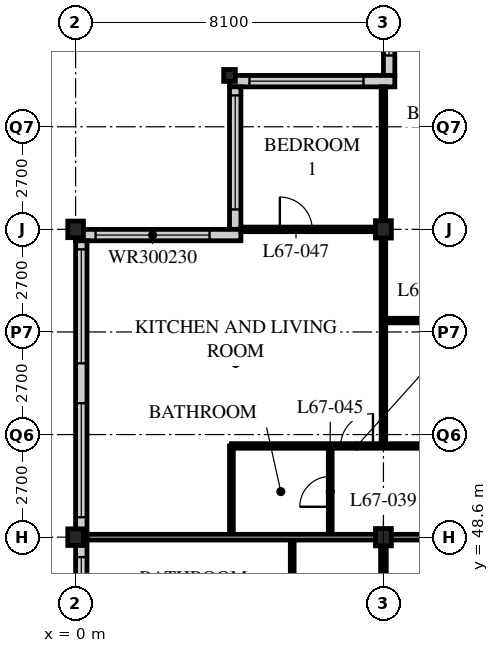
"""IFC4 building model, lengths in metres.
Left out: names, types, materials, properties, quantities, classifications, styles, units other than length and angle.
Written with IfcOpenShell. Run it as: python <this file> out.ifc"""

import sys

from ifc_helpers import new_model, si_unit, direction, frame, frame_2d, origin, origin_2d, place, context, subcontext, project, spatial, rectangle, i_section, extrude, element, fill, save


model = new_model("IFC4")
c1 = context("Model", 3, precision=1e-05, world=origin(), true_north=direction((0.0, 1.0)))
c2 = subcontext(c1, "Body", "Model", "MODEL_VIEW")
j1 = project(units=[si_unit("LENGTHUNIT", "METRE"), si_unit("PLANEANGLEUNIT", "RADIAN")], contexts=[c1])
p1 = place(None, origin())
s1 = spatial("IfcSite", under=j1, at=p1, CompositionType="ELEMENT")
p2 = place(p1, origin())
s2 = spatial("IfcBuilding", under=s1, at=p2, CompositionType="ELEMENT")
p3 = place(p2, frame((0.0, 0.0, 261.9)))
s3 = spatial("IfcBuildingStorey", under=s2, at=p3, CompositionType="ELEMENT", Elevation=261.9)
for number, where, z_axis, x_axis in (
    (1, (0.0, 48.6, 0.0), (0.0, 0.0, 1.0), (1.0, 0.0, 0.0)),
    (2, (0.0, 56.7, 0.0), (0.0, 0.0, 1.0), (1.0, 0.0, 0.0)),
):
    element("IfcColumn", number, at=place(p3, frame(where, z_axis=z_axis, x_axis=x_axis)), inside=s3, PredefinedType="COLUMN", context=c2, shape_type="SweptSolid", body=[
        extrude(i_section(OverallWidth=0.412, OverallDepth=0.437, WebThickness=0.036, FlangeThickness=0.058, FilletRadius=0.015, at=origin_2d()), origin(), (0.0, 0.0, 1.0), 3.9),
    ])
p4 = place(p3, frame((4.05, 60.75, 0.0), z_axis=(0.0, 0.0, 1.0), x_axis=(1.0, 0.0, 0.0)))
e3 = element("IfcColumn", 3, at=p4, inside=s3, PredefinedType="COLUMN", context=c2, shape_type="SweptSolid", body=[
    extrude(i_section(OverallWidth=0.307, OverallDepth=0.314, WebThickness=0.012, FlangeThickness=0.019, FilletRadius=0.015, at=origin_2d()), origin(), (0.0, 0.0, 1.0), 3.9),
])
for number, where, z_axis, x_axis in (
    (4, (8.1, 48.6, 0.0), (0.0, 0.0, 1.0), (1.0, 0.0, 0.0)),
    (5, (8.1, 56.7, 0.0), (0.0, 0.0, 1.0), (1.0, 0.0, 0.0)),
):
    element("IfcColumn", number, at=place(p3, frame(where, z_axis=z_axis, x_axis=x_axis)), inside=s3, PredefinedType="COLUMN", context=c2, shape_type="SweptSolid", body=[
        extrude(i_section(OverallWidth=0.418, OverallDepth=0.456, WebThickness=0.042, FlangeThickness=0.067, FilletRadius=0.015, at=origin_2d()), origin(), (0.0, 0.0, 1.0), 3.9),
    ])
p5 = place(p3, frame((8.25, 64.5, 0.0), z_axis=(0.0, 0.0, 1.0), x_axis=(0.0, -1.0, 0.0)))
e6 = element("IfcWall", 6, at=p5, inside=s3, PredefinedType="SOLIDWALL", context=c2, shape_type="SweptSolid", body=[
    extrude(rectangle(XDim=3.75, YDim=0.3, at=frame_2d((1.875, 0.0))), origin(), (0.0, 0.0, 1.0), 3.69),
])
p6 = place(p5, frame((0.225, 0.0, 0.6)))
e7 = element("IfcOpeningElement", 7, at=p6, cuts=e6, PredefinedType="OPENING", context=c2, shape_type="SweptSolid", body=[
    extrude(rectangle(XDim=3.0, YDim=2.3, at=frame_2d((1.5, 1.15))), frame((0.0, 0.16, 0.0), z_axis=(0.0, -1.0, 0.0), x_axis=(1.0, 0.0, 0.0)), (0.0, 0.0, 1.0), 0.32),
])
p7 = place(p3, frame((8.4, 60.6, 0.0), z_axis=(0.0, 0.0, 1.0), x_axis=(-1.0, 0.0, 0.0)))
e8 = element("IfcWall", 8, at=p7, inside=s3, PredefinedType="SOLIDWALL", context=c2, shape_type="SweptSolid", body=[
    extrude(rectangle(XDim=4.35, YDim=0.3, at=frame_2d((2.175, 0.0))), origin(), (0.0, 0.0, 1.0), 3.69),
])
p8 = place(p7, frame((0.825, 0.0, 0.6)))
e9 = element("IfcOpeningElement", 9, at=p8, cuts=e8, PredefinedType="OPENING", context=c2, shape_type="SweptSolid", body=[
    extrude(rectangle(XDim=3.0, YDim=2.3, at=frame_2d((1.5, 1.15))), frame((0.0, 0.16, 0.0), z_axis=(0.0, -1.0, 0.0), x_axis=(1.0, 0.0, 0.0)), (0.0, 0.0, 1.0), 0.32),
])
p9 = place(p3, frame((4.2, 60.45, 0.0), z_axis=(0.0, 0.0, 1.0), x_axis=(0.0, -1.0, 0.0)))
e10 = element("IfcWall", 10, at=p9, inside=s3, PredefinedType="SOLIDWALL", context=c2, shape_type="SweptSolid", body=[
    extrude(rectangle(XDim=3.75, YDim=0.3, at=frame_2d((1.875, 0.0))), origin(), (0.0, 0.0, 1.0), 3.69),
])
p10 = place(p9, frame((0.225, 0.0, 0.6)))
e11 = element("IfcOpeningElement", 11, at=p10, cuts=e10, PredefinedType="OPENING", context=c2, shape_type="SweptSolid", body=[
    extrude(rectangle(XDim=3.0, YDim=2.3, at=frame_2d((1.5, 1.15))), frame((0.0, 0.16, 0.0), z_axis=(0.0, -1.0, 0.0), x_axis=(1.0, 0.0, 0.0)), (0.0, 0.0, 1.0), 0.32),
])
p11 = place(p3, frame((4.35, 56.55, 0.0), z_axis=(0.0, 0.0, 1.0), x_axis=(-1.0, 0.0, 0.0)))
e12 = element("IfcWall", 12, at=p11, inside=s3, PredefinedType="SOLIDWALL", context=c2, shape_type="SweptSolid", body=[
    extrude(rectangle(XDim=4.35, YDim=0.3, at=frame_2d((2.175, 0.0))), origin(), (0.0, 0.0, 1.0), 3.69),
])
p12 = place(p11, frame((0.825, 0.0, 0.6)))
e13 = element("IfcOpeningElement", 13, at=p12, cuts=e12, PredefinedType="OPENING", context=c2, shape_type="SweptSolid", body=[
    extrude(rectangle(XDim=3.0, YDim=2.3, at=frame_2d((1.5, 1.15))), frame((0.0, 0.16, 0.0), z_axis=(0.0, -1.0, 0.0), x_axis=(1.0, 0.0, 0.0)), (0.0, 0.0, 1.0), 0.32),
])
p13 = place(p3, frame((0.15, 56.4, 0.0), z_axis=(0.0, 0.0, 1.0), x_axis=(0.0, -1.0, 0.0)))
e14 = element("IfcWall", 14, at=p13, inside=s3, PredefinedType="SOLIDWALL", context=c2, shape_type="SweptSolid", body=[
    extrude(rectangle(XDim=32.1, YDim=0.3, at=frame_2d((16.05, 0.0))), origin(), (0.0, 0.0, 1.0), 3.69),
])
p14 = place(p13, frame((0.225, 0.0, 0.6)))
e15 = element("IfcOpeningElement", 15, at=p14, cuts=e14, PredefinedType="OPENING", context=c2, shape_type="SweptSolid", body=[
    extrude(rectangle(XDim=3.0, YDim=2.4, at=frame_2d((1.5, 1.2))), frame((0.0, 0.16, 0.0), z_axis=(0.0, -1.0, 0.0), x_axis=(1.0, 0.0, 0.0)), (0.0, 0.0, 1.0), 0.32),
])
p15 = place(p13, frame((4.275, 0.0, 0.6)))
e16 = element("IfcOpeningElement", 16, at=p15, cuts=e14, PredefinedType="OPENING", context=c2, shape_type="SweptSolid", body=[
    extrude(rectangle(XDim=3.0, YDim=2.4, at=frame_2d((1.5, 1.2))), frame((0.0, 0.16, 0.0), z_axis=(0.0, -1.0, 0.0), x_axis=(1.0, 0.0, 0.0)), (0.0, 0.0, 1.0), 0.32),
])
p16 = place(p13, frame((8.325, 0.0, 0.6)))
e17 = element("IfcOpeningElement", 17, at=p16, cuts=e14, PredefinedType="OPENING", context=c2, shape_type="SweptSolid", body=[
    extrude(rectangle(XDim=3.0, YDim=2.4, at=frame_2d((1.5, 1.2))), frame((0.0, 0.16, 0.0), z_axis=(0.0, -1.0, 0.0), x_axis=(1.0, 0.0, 0.0)), (0.0, 0.0, 1.0), 0.32),
])
p17 = place(p13, frame((12.375, 0.0, 0.6)))
e18 = element("IfcOpeningElement", 18, at=p17, cuts=e14, PredefinedType="OPENING", context=c2, shape_type="SweptSolid", body=[
    extrude(rectangle(XDim=3.0, YDim=2.4, at=frame_2d((1.5, 1.2))), frame((0.0, 0.16, 0.0), z_axis=(0.0, -1.0, 0.0), x_axis=(1.0, 0.0, 0.0)), (0.0, 0.0, 1.0), 0.32),
])
p18 = place(p13, frame((16.425, 0.0, 0.6)))
e19 = element("IfcOpeningElement", 19, at=p18, cuts=e14, PredefinedType="OPENING", context=c2, shape_type="SweptSolid", body=[
    extrude(rectangle(XDim=3.0, YDim=2.4, at=frame_2d((1.5, 1.2))), frame((0.0, 0.16, 0.0), z_axis=(0.0, -1.0, 0.0), x_axis=(1.0, 0.0, 0.0)), (0.0, 0.0, 1.0), 0.32),
])
p19 = place(p13, frame((20.475, 0.0, 0.6)))
e20 = element("IfcOpeningElement", 20, at=p19, cuts=e14, PredefinedType="OPENING", context=c2, shape_type="SweptSolid", body=[
    extrude(rectangle(XDim=3.0, YDim=2.4, at=frame_2d((1.5, 1.2))), frame((0.0, 0.16, 0.0), z_axis=(0.0, -1.0, 0.0), x_axis=(1.0, 0.0, 0.0)), (0.0, 0.0, 1.0), 0.32),
])
p20 = place(p13, frame((24.525, 0.0, 0.6)))
e21 = element("IfcOpeningElement", 21, at=p20, cuts=e14, PredefinedType="OPENING", context=c2, shape_type="SweptSolid", body=[
    extrude(rectangle(XDim=3.0, YDim=2.4, at=frame_2d((1.5, 1.2))), frame((0.0, 0.16, 0.0), z_axis=(0.0, -1.0, 0.0), x_axis=(1.0, 0.0, 0.0)), (0.0, 0.0, 1.0), 0.32),
])
p21 = place(p13, frame((28.575, 0.0, 0.6)))
e22 = element("IfcOpeningElement", 22, at=p21, cuts=e14, PredefinedType="OPENING", context=c2, shape_type="SweptSolid", body=[
    extrude(rectangle(XDim=3.0, YDim=2.4, at=frame_2d((1.5, 1.2))), frame((0.0, 0.16, 0.0), z_axis=(0.0, -1.0, 0.0), x_axis=(1.0, 0.0, 0.0)), (0.0, 0.0, 1.0), 0.32),
])
p22 = place(p3, frame((8.1, 48.6, 0.0), z_axis=(0.0, 0.0, 1.0), x_axis=(1.0, 0.0, 0.0)))
e23 = element("IfcWall", 23, at=p22, inside=s3, PredefinedType="PARTITIONING", context=c2, shape_type="SweptSolid", body=[
    extrude(rectangle(XDim=28.35, YDim=0.15, at=frame_2d((14.175, 0.0))), origin(), (0.0, 0.0, 1.0), 3.078),
])
p23 = place(p22, frame((4.45, 0.0, 0.0)))
e24 = element("IfcOpeningElement", 24, at=p23, cuts=e23, PredefinedType="OPENING", context=c2, shape_type="SweptSolid", body=[
    extrude(rectangle(XDim=1.0, YDim=2.1, at=frame_2d((0.5, 1.05))), frame((0.0, 0.085, 0.0), z_axis=(0.0, -1.0, 0.0), x_axis=(1.0, 0.0, 0.0)), (0.0, 0.0, 1.0), 0.17),
])
p24 = place(p22, frame((20.65, 0.0, 0.0)))
e25 = element("IfcOpeningElement", 25, at=p24, cuts=e23, PredefinedType="OPENING", context=c2, shape_type="SweptSolid", body=[
    extrude(rectangle(XDim=1.0, YDim=2.1, at=frame_2d((0.5, 1.05))), frame((0.0, 0.085, 0.0), z_axis=(0.0, -1.0, 0.0), x_axis=(1.0, 0.0, 0.0)), (0.0, 0.0, 1.0), 0.17),
])
p25 = place(p22, frame((1.525, 0.0, 0.0)))
e26 = element("IfcOpeningElement", 26, at=p25, cuts=e23, PredefinedType="OPENING", context=c2, shape_type="SweptSolid", body=[
    extrude(rectangle(XDim=1.0, YDim=2.1, at=frame_2d((0.5, 1.05))), frame((0.0, 0.085, 0.0), z_axis=(0.0, -1.0, 0.0), x_axis=(1.0, 0.0, 0.0)), (0.0, 0.0, 1.0), 0.17),
])
p26 = place(p3, frame((8.1, 22.5, 0.0), z_axis=(0.0, 0.0, 1.0), x_axis=(0.0, 1.0, 0.0)))
e27 = element("IfcWall", 27, at=p26, inside=s3, PredefinedType="PARTITIONING", context=c2, shape_type="SweptSolid", body=[
    extrude(rectangle(XDim=26.1, YDim=0.15, at=frame_2d((13.05, 0.0))), origin(), (0.0, 0.0, 1.0), 3.078),
])
p27 = place(p26, frame((2.65, 0.0, 0.0)))
e28 = element("IfcOpeningElement", 28, at=p27, cuts=e27, PredefinedType="OPENING", context=c2, shape_type="SweptSolid", body=[
    extrude(rectangle(XDim=1.0, YDim=2.1, at=frame_2d((0.5, 1.05))), frame((0.0, 0.085, 0.0), z_axis=(0.0, -1.0, 0.0), x_axis=(1.0, 0.0, 0.0)), (0.0, 0.0, 1.0), 0.17),
])
p28 = place(p26, frame((22.75, 0.0, 0.0)))
e29 = element("IfcOpeningElement", 29, at=p28, cuts=e27, PredefinedType="OPENING", context=c2, shape_type="SweptSolid", body=[
    extrude(rectangle(XDim=1.0, YDim=2.1, at=frame_2d((0.5, 1.05))), frame((0.0, 0.085, 0.0), z_axis=(0.0, -1.0, 0.0), x_axis=(1.0, 0.0, 0.0)), (0.0, 0.0, 1.0), 0.17),
])
p29 = place(p3, frame((5.7, 46.4, 0.0), z_axis=(0.0, 0.0, 1.0), x_axis=(0.0, 1.0, 0.0)))
e30 = element("IfcWall", 30, at=p29, inside=s3, PredefinedType="PARTITIONING", context=c2, shape_type="SweptSolid", body=[
    extrude(rectangle(XDim=2.2, YDim=0.1, at=frame_2d((1.1, 0.0))), origin(), (0.0, 0.0, 1.0), 3.69),
])
p30 = place(p3, frame((6.7, 48.6, 0.0), z_axis=(0.0, 0.0, 1.0), x_axis=(0.0, 1.0, 0.0)))
e31 = element("IfcWall", 31, at=p30, inside=s3, PredefinedType="PARTITIONING", context=c2, shape_type="SweptSolid", body=[
    extrude(rectangle(XDim=2.4, YDim=0.1, at=frame_2d((1.2, 0.0))), origin(), (0.0, 0.0, 1.0), 3.69),
])
p31 = place(p30, frame((0.8, 0.0, 0.0)))
e32 = element("IfcOpeningElement", 32, at=p31, cuts=e31, PredefinedType="OPENING", context=c2, shape_type="SweptSolid", body=[
    extrude(rectangle(XDim=0.8, YDim=2.1, at=frame_2d((0.4, 1.05))), frame((0.0, 0.06, 0.0), z_axis=(0.0, -1.0, 0.0), x_axis=(1.0, 0.0, 0.0)), (0.0, 0.0, 1.0), 0.12),
])
p32 = place(p3, frame((4.1, 48.6, 0.0), z_axis=(0.0, 0.0, 1.0), x_axis=(0.0, 1.0, 0.0)))
e33 = element("IfcWall", 33, at=p32, inside=s3, PredefinedType="PARTITIONING", context=c2, shape_type="SweptSolid", body=[
    extrude(rectangle(XDim=2.4, YDim=0.1, at=frame_2d((1.2, 0.0))), origin(), (0.0, 0.0, 1.0), 3.69),
])
p33 = place(p3, frame((4.1, 51.0, 0.0), z_axis=(0.0, 0.0, 1.0), x_axis=(1.0, 0.0, 0.0)))
e34 = element("IfcWall", 34, at=p33, inside=s3, PredefinedType="PARTITIONING", context=c2, shape_type="SweptSolid", body=[
    extrude(rectangle(XDim=32.35, YDim=0.12, at=frame_2d((16.175, 0.0))), origin(), (0.0, 0.0, 1.0), 3.69),
])
p34 = place(p33, frame((9.025, 0.0, 0.0)))
e35 = element("IfcOpeningElement", 35, at=p34, cuts=e34, PredefinedType="OPENING", context=c2, shape_type="SweptSolid", body=[
    extrude(rectangle(XDim=0.85, YDim=2.1, at=frame_2d((0.425, 1.05))), frame((0.0, 0.07, 0.0), z_axis=(0.0, -1.0, 0.0), x_axis=(1.0, 0.0, 0.0)), (0.0, 0.0, 1.0), 0.14),
])
p35 = place(p33, frame((16.475, 0.0, 0.0)))
e36 = element("IfcOpeningElement", 36, at=p35, cuts=e34, PredefinedType="OPENING", context=c2, shape_type="SweptSolid", body=[
    extrude(rectangle(XDim=0.85, YDim=2.1, at=frame_2d((0.425, 1.05))), frame((0.0, 0.07, 0.0), z_axis=(0.0, -1.0, 0.0), x_axis=(1.0, 0.0, 0.0)), (0.0, 0.0, 1.0), 0.14),
])
p36 = place(p33, frame((20.525, 0.0, 0.0)))
e37 = element("IfcOpeningElement", 37, at=p36, cuts=e34, PredefinedType="OPENING", context=c2, shape_type="SweptSolid", body=[
    extrude(rectangle(XDim=0.85, YDim=2.1, at=frame_2d((0.425, 1.05))), frame((0.0, 0.07, 0.0), z_axis=(0.0, -1.0, 0.0), x_axis=(1.0, 0.0, 0.0)), (0.0, 0.0, 1.0), 0.14),
])
p37 = place(p33, frame((25.225, 0.0, 0.0)))
e38 = element("IfcOpeningElement", 38, at=p37, cuts=e34, PredefinedType="OPENING", context=c2, shape_type="SweptSolid", body=[
    extrude(rectangle(XDim=0.85, YDim=2.1, at=frame_2d((0.425, 1.05))), frame((0.0, 0.07, 0.0), z_axis=(0.0, -1.0, 0.0), x_axis=(1.0, 0.0, 0.0)), (0.0, 0.0, 1.0), 0.14),
])
p38 = place(p33, frame((28.625, 0.0, 0.0)))
e39 = element("IfcOpeningElement", 39, at=p38, cuts=e34, PredefinedType="OPENING", context=c2, shape_type="SweptSolid", body=[
    extrude(rectangle(XDim=0.85, YDim=2.1, at=frame_2d((0.425, 1.05))), frame((0.0, 0.07, 0.0), z_axis=(0.0, -1.0, 0.0), x_axis=(1.0, 0.0, 0.0)), (0.0, 0.0, 1.0), 0.14),
])
p39 = place(p33, frame((6.725, 0.0, 0.0)))
e40 = element("IfcOpeningElement", 40, at=p39, cuts=e34, PredefinedType="OPENING", context=c2, shape_type="SweptSolid", body=[
    extrude(rectangle(XDim=0.85, YDim=2.1, at=frame_2d((0.425, 1.05))), frame((0.0, 0.07, 0.0), z_axis=(0.0, -1.0, 0.0), x_axis=(1.0, 0.0, 0.0)), (0.0, 0.0, 1.0), 0.14),
])
p40 = place(p33, frame((2.875, 0.0, 0.0)))
e41 = element("IfcOpeningElement", 41, at=p40, cuts=e34, PredefinedType="OPENING", context=c2, shape_type="SweptSolid", body=[
    extrude(rectangle(XDim=0.85, YDim=2.1, at=frame_2d((0.425, 1.05))), frame((0.0, 0.07, 0.0), z_axis=(0.0, -1.0, 0.0), x_axis=(1.0, 0.0, 0.0)), (0.0, 0.0, 1.0), 0.14),
])
p41 = place(p3, frame((8.1, 51.0, 0.0), z_axis=(0.0, 0.0, 1.0), x_axis=(0.0, 1.0, 0.0)))
e42 = element("IfcWall", 42, at=p41, inside=s3, PredefinedType="PARTITIONING", context=c2, shape_type="SweptSolid", body=[
    extrude(rectangle(XDim=9.45, YDim=0.12, at=frame_2d((4.725, 0.0))), origin(), (0.0, 0.0, 1.0), 3.078),
])
p42 = place(p3, frame((8.1, 56.7, 0.0), z_axis=(0.0, 0.0, 1.0), x_axis=(-1.0, 0.0, 0.0)))
e43 = element("IfcWall", 43, at=p42, inside=s3, PredefinedType="PARTITIONING", context=c2, shape_type="SweptSolid", body=[
    extrude(rectangle(XDim=3.75, YDim=0.12, at=frame_2d((1.875, 0.0))), origin(), (0.0, 0.0, 1.0), 3.078),
])
p43 = place(p42, frame((1.875, 0.0, 0.0)))
e44 = element("IfcOpeningElement", 44, at=p43, cuts=e43, PredefinedType="OPENING", context=c2, shape_type="SweptSolid", body=[
    extrude(rectangle(XDim=0.85, YDim=2.1, at=frame_2d((0.425, 1.05))), frame((0.0, 0.07, 0.0), z_axis=(0.0, -1.0, 0.0), x_axis=(1.0, 0.0, 0.0)), (0.0, 0.0, 1.0), 0.14),
])
p44 = place(p3, frame((0.3, 48.6, 0.0), z_axis=(0.0, 0.0, 1.0), x_axis=(1.0, 0.0, 0.0)))
e45 = element("IfcWall", 45, at=p44, inside=s3, PredefinedType="PARTITIONING", context=c2, shape_type="SweptSolid", body=[
    extrude(rectangle(XDim=7.8, YDim=0.15, at=frame_2d((3.9, 0.0))), origin(), (0.0, 0.0, 1.0), 3.078),
])
p45 = place(p3, frame((8.1, 54.3, 0.0), z_axis=(0.0, 0.0, 1.0), x_axis=(1.0, 0.0, 0.0)))
e46 = element("IfcWall", 46, at=p45, inside=s3, PredefinedType="PARTITIONING", context=c2, shape_type="SweptSolid", body=[
    extrude(rectangle(XDim=4.05, YDim=0.12, at=frame_2d((2.025, 0.0))), origin(), (0.0, 0.0, 1.0), 3.69),
])
p46 = place(p45, frame((1.6, 0.0, 0.0)))
e47 = element("IfcOpeningElement", 47, at=p46, cuts=e46, PredefinedType="OPENING", context=c2, shape_type="SweptSolid", body=[
    extrude(rectangle(XDim=0.85, YDim=2.1, at=frame_2d((0.425, 1.05))), frame((0.0, 0.07, 0.0), z_axis=(0.0, -1.0, 0.0), x_axis=(1.0, 0.0, 0.0)), (0.0, 0.0, 1.0), 0.14),
])
p47 = place(p6, origin())
e48 = element("IfcWindow", 48, at=p47, inside=s3, PartitioningType="SINGLE_PANEL", PredefinedType="WINDOW", context=c2, shape_type="SweptSolid", body=[
    extrude(rectangle(XDim=3.0, YDim=2.3, at=frame_2d((1.5, 1.15))), frame((0.0, 0.03, 0.0), z_axis=(0.0, -1.0, 0.0), x_axis=(1.0, 0.0, 0.0)), (0.0, 0.0, 1.0), 0.06),
])
fill(e7, e48)
p48 = place(p8, origin())
e49 = element("IfcWindow", 49, at=p48, inside=s3, PartitioningType="SINGLE_PANEL", PredefinedType="WINDOW", context=c2, shape_type="SweptSolid", body=[
    extrude(rectangle(XDim=3.0, YDim=2.3, at=frame_2d((1.5, 1.15))), frame((0.0, 0.03, 0.0), z_axis=(0.0, -1.0, 0.0), x_axis=(1.0, 0.0, 0.0)), (0.0, 0.0, 1.0), 0.06),
])
fill(e9, e49)
p49 = place(p10, origin())
e50 = element("IfcWindow", 50, at=p49, inside=s3, PartitioningType="SINGLE_PANEL", PredefinedType="WINDOW", context=c2, shape_type="SweptSolid", body=[
    extrude(rectangle(XDim=3.0, YDim=2.3, at=frame_2d((1.5, 1.15))), frame((0.0, 0.03, 0.0), z_axis=(0.0, -1.0, 0.0), x_axis=(1.0, 0.0, 0.0)), (0.0, 0.0, 1.0), 0.06),
])
fill(e11, e50)
p50 = place(p12, origin())
e51 = element("IfcWindow", 51, at=p50, inside=s3, PartitioningType="SINGLE_PANEL", PredefinedType="WINDOW", context=c2, shape_type="SweptSolid", body=[
    extrude(rectangle(XDim=3.0, YDim=2.3, at=frame_2d((1.5, 1.15))), frame((0.0, 0.03, 0.0), z_axis=(0.0, -1.0, 0.0), x_axis=(1.0, 0.0, 0.0)), (0.0, 0.0, 1.0), 0.06),
])
fill(e13, e51)
p51 = place(p14, origin())
e52 = element("IfcWindow", 52, at=p51, inside=s3, PartitioningType="SINGLE_PANEL", PredefinedType="WINDOW", context=c2, shape_type="SweptSolid", body=[
    extrude(rectangle(XDim=3.0, YDim=2.4, at=frame_2d((1.5, 1.2))), frame((0.0, 0.03, 0.0), z_axis=(0.0, -1.0, 0.0), x_axis=(1.0, 0.0, 0.0)), (0.0, 0.0, 1.0), 0.06),
])
fill(e15, e52)
p52 = place(p15, origin())
e53 = element("IfcWindow", 53, at=p52, inside=s3, PartitioningType="SINGLE_PANEL", PredefinedType="WINDOW", context=c2, shape_type="SweptSolid", body=[
    extrude(rectangle(XDim=3.0, YDim=2.4, at=frame_2d((1.5, 1.2))), frame((0.0, 0.03, 0.0), z_axis=(0.0, -1.0, 0.0), x_axis=(1.0, 0.0, 0.0)), (0.0, 0.0, 1.0), 0.06),
])
fill(e16, e53)
p53 = place(p16, origin())
e54 = element("IfcWindow", 54, at=p53, inside=s3, PartitioningType="SINGLE_PANEL", PredefinedType="WINDOW", context=c2, shape_type="SweptSolid", body=[
    extrude(rectangle(XDim=3.0, YDim=2.4, at=frame_2d((1.5, 1.2))), frame((0.0, 0.03, 0.0), z_axis=(0.0, -1.0, 0.0), x_axis=(1.0, 0.0, 0.0)), (0.0, 0.0, 1.0), 0.06),
])
fill(e17, e54)
p54 = place(p31, origin())
e55 = element("IfcDoor", 55, at=p54, inside=s3, OperationType="SINGLE_SWING_LEFT", PredefinedType="DOOR", context=c2, shape_type="SweptSolid", body=[
    extrude(rectangle(XDim=0.8, YDim=2.1, at=frame_2d((0.4, 1.05))), frame((0.0, 0.025, 0.0), z_axis=(0.0, -1.0, 0.0), x_axis=(1.0, 0.0, 0.0)), (0.0, 0.0, 1.0), 0.05),
])
fill(e32, e55)
p55 = place(p40, origin())
e56 = element("IfcDoor", 56, at=p55, inside=s3, OperationType="SINGLE_SWING_RIGHT", PredefinedType="DOOR", context=c2, shape_type="SweptSolid", body=[
    extrude(rectangle(XDim=0.85, YDim=2.1, at=frame_2d((0.425, 1.05))), frame((0.0, 0.025, 0.0), z_axis=(0.0, -1.0, 0.0), x_axis=(1.0, 0.0, 0.0)), (0.0, 0.0, 1.0), 0.05),
])
fill(e41, e56)
p56 = place(p43, origin())
e57 = element("IfcDoor", 57, at=p56, inside=s3, OperationType="SINGLE_SWING_LEFT", PredefinedType="DOOR", context=c2, shape_type="SweptSolid", body=[
    extrude(rectangle(XDim=0.85, YDim=2.1, at=frame_2d((0.425, 1.05))), frame((0.0, 0.025, 0.0), z_axis=(0.0, -1.0, 0.0), x_axis=(1.0, 0.0, 0.0)), (0.0, 0.0, 1.0), 0.05),
])
fill(e44, e57)
save(model, sys.argv[1])
